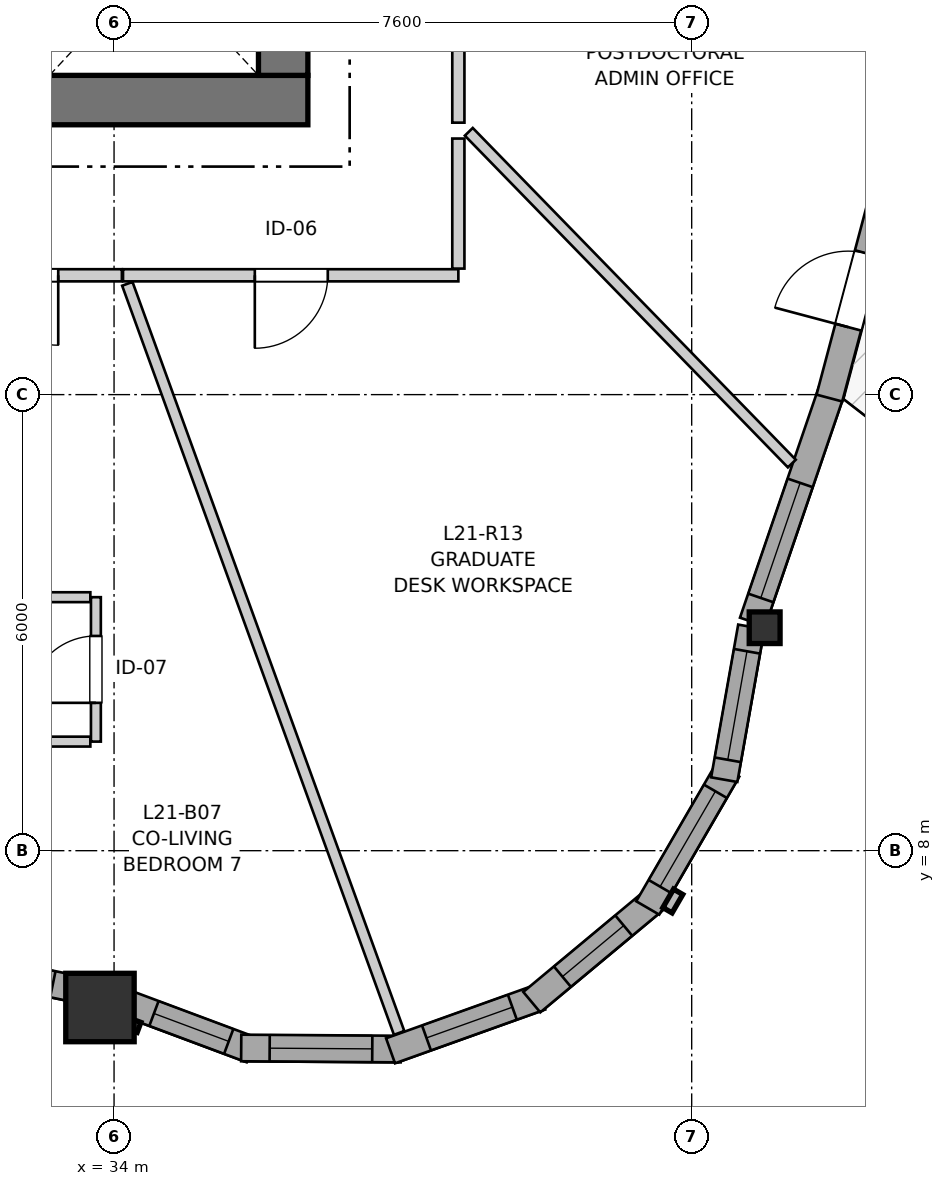
"""IFC4 building model, lengths in metres.
Left out: names, types, materials, properties, quantities, classifications, styles, units other than length and angle.
Written with IfcOpenShell. Run it as: python <this file> out.ifc"""

import sys

from ifc_helpers import new_model, si_unit, direction, frame, frame_2d, origin, origin_2d, place, context, subcontext, project, spatial, rectangle, i_section, extrude, source, transform, mapped, element, fill, save


model = new_model("IFC4")
c1 = context("Model", 3, precision=1e-05, world=origin(), true_north=direction((0.0, 1.0)))
c2 = subcontext(c1, "Body", "Model", "MODEL_VIEW")
j1 = project(units=[si_unit("LENGTHUNIT", "METRE"), si_unit("PLANEANGLEUNIT", "RADIAN")], contexts=[c1])
p1 = place(None, origin())
s1 = spatial("IfcSite", under=j1, at=p1, CompositionType="ELEMENT")
p2 = place(p1, origin())
s2 = spatial("IfcBuilding", under=s1, at=p2, CompositionType="ELEMENT")
p3 = place(p2, frame((0.0, 0.0, 73.6)))
s3 = spatial("IfcBuildingStorey", under=s2, at=p3, CompositionType="ELEMENT", Elevation=73.6)
p4 = place(p3, frame((24.15, 17.875, 0.0), z_axis=(0.0, 0.0, 1.0), x_axis=(1.0, 0.0, 0.0)))
e1 = element("IfcWall", 1, at=p4, inside=s3, PredefinedType="SHEAR", context=c2, shape_type="SweptSolid", body=[
    extrude(rectangle(XDim=12.4, YDim=0.65, at=frame_2d((6.2, 0.0))), origin(), (0.0, 0.0, 1.0), 2.95),
])
p5 = place(p3, frame((36.225, 18.2, 0.0), z_axis=(0.0, 0.0, 1.0), x_axis=(0.0, 1.0, 0.0)))
e2 = element("IfcWall", 2, at=p5, inside=s3, PredefinedType="SHEAR", context=c2, shape_type="SweptSolid", body=[
    extrude(rectangle(XDim=15.6, YDim=0.65, at=frame_2d((7.8, 0.0))), origin(), (0.0, 0.0, 1.0), 2.95),
])
p6 = place(p5, frame((4.25, 0.0, 0.0)))
e3 = element("IfcOpeningElement", 3, at=p6, cuts=e2, PredefinedType="OPENING", context=c2, shape_type="SweptSolid", body=[
    extrude(rectangle(XDim=1.1, YDim=2.15, at=frame_2d((0.55, 1.075))), frame((0.0, 0.335, 0.0), z_axis=(0.0, -1.0, 0.0), x_axis=(1.0, 0.0, 0.0)), (0.0, 0.0, 1.0), 0.67),
])
p7 = place(p5, frame((10.25, 0.0, 0.0)))
e4 = element("IfcOpeningElement", 4, at=p7, cuts=e2, PredefinedType="OPENING", context=c2, shape_type="SweptSolid", body=[
    extrude(rectangle(XDim=1.1, YDim=2.15, at=frame_2d((0.55, 1.075))), frame((0.0, 0.335, 0.0), z_axis=(0.0, -1.0, 0.0), x_axis=(1.0, 0.0, 0.0)), (0.0, 0.0, 1.0), 0.67),
])
m1 = source(origin(), c2, "Body", "SweptSolid", [
    extrude(rectangle(XDim=0.9, YDim=0.9, at=origin_2d()), origin(), (0.0, 0.0, 1.0), 2.95),
])
p8 = place(p3, frame((33.815, 5.937, 0.0), z_axis=(0.0, 0.0, 1.0), x_axis=(1.0, 0.0, 0.0)))
e5 = element("IfcColumn", 5, at=p8, inside=s3, PredefinedType="COLUMN", context=c2, shape_type="MappedRepresentation", body=[
    mapped(m1, transform((0.0, 0.0, 0.0), x_axis=(1.0, 0.0, 0.0), y_axis=(0.0, 1.0, 0.0), z_axis=(0.0, 0.0, 1.0), scale=1.0)),
])
m2 = source(origin(), c2, "Body", "SweptSolid", [
    extrude(i_section(OverallWidth=0.406, OverallDepth=0.416, WebThickness=0.027, FlangeThickness=0.044, FilletRadius=0.015, at=origin_2d()), origin(), (0.0, 0.0, 1.0), 2.95),
])
p9 = place(p3, frame((42.56, 10.933, 0.0), z_axis=(0.0, 0.0, 1.0), x_axis=(1.0, 0.0, 0.0)))
e6 = element("IfcColumn", 6, at=p9, inside=s3, PredefinedType="PILASTER", context=c2, shape_type="MappedRepresentation", body=[
    mapped(m2, transform((0.0, 0.0, 0.0), x_axis=(1.0, 0.0, 0.0), y_axis=(0.0, 1.0, 0.0), z_axis=(0.0, 0.0, 1.0), scale=1.0)),
])
p10 = place(p3, frame((30.741, 6.748, 0.0), z_axis=(0.0, 0.0, 1.0), x_axis=(0.979446941056, -0.201701982282, 0.0)))
e7 = element("IfcWall", 7, at=p10, inside=s3, PredefinedType="SOLIDWALL", context=c2, shape_type="SweptSolid", body=[
    extrude(rectangle(XDim=2.948, YDim=0.35, at=frame_2d((1.474, 0.0))), origin(), (0.0, 0.0, 1.0), 2.48),
])
p11 = place(p10, frame((0.27, 0.0, 0.82)))
e8 = element("IfcOpeningElement", 8, at=p11, cuts=e7, PredefinedType="OPENING", context=c2, shape_type="SweptSolid", body=[
    extrude(rectangle(XDim=1.25, YDim=1.35, at=frame_2d((0.625, 0.675))), frame((0.0, 0.185, 0.0), z_axis=(0.0, -1.0, 0.0), x_axis=(1.0, 0.0, 0.0)), (0.0, 0.0, 1.0), 0.37),
])
p12 = place(p10, frame((1.925, 0.0, 0.82)))
e9 = element("IfcOpeningElement", 9, at=p12, cuts=e7, PredefinedType="OPENING", context=c2, shape_type="SweptSolid", body=[
    extrude(rectangle(XDim=0.58, YDim=1.35, at=frame_2d((0.29, 0.675))), frame((0.0, 0.185, 0.0), z_axis=(0.0, -1.0, 0.0), x_axis=(1.0, 0.0, 0.0)), (0.0, 0.0, 1.0), 0.37),
])
p13 = place(p3, frame((34.087, 6.022, 0.0), z_axis=(0.0, 0.0, 1.0), x_axis=(0.9368310555, -0.349782180007, 0.0)))
e10 = element("IfcWall", 10, at=p13, inside=s3, PredefinedType="SOLIDWALL", context=c2, shape_type="SweptSolid", body=[
    extrude(rectangle(XDim=1.836, YDim=0.35, at=frame_2d((0.918, 0.0))), origin(), (0.0, 0.0, 1.0), 2.48),
])
p14 = place(p13, frame((0.468, 0.0, 0.82)))
e11 = element("IfcOpeningElement", 11, at=p14, cuts=e10, PredefinedType="OPENING", context=c2, shape_type="SweptSolid", body=[
    extrude(rectangle(XDim=1.05, YDim=1.45, at=frame_2d((0.525, 0.725))), frame((0.0, 0.185, 0.0), z_axis=(0.0, -1.0, 0.0), x_axis=(1.0, 0.0, 0.0)), (0.0, 0.0, 1.0), 0.37),
])
p15 = place(p3, frame((35.673, 5.404, 0.0), z_axis=(0.0, 0.0, 1.0), x_axis=(0.999976451414, -0.006862697526, 0.0)))
e12 = element("IfcWall", 12, at=p15, inside=s3, PredefinedType="SOLIDWALL", context=c2, shape_type="SweptSolid", body=[
    extrude(rectangle(XDim=2.099, YDim=0.35, at=frame_2d((1.049, 0.0))), origin(), (0.0, 0.0, 1.0), 2.48),
])
p16 = place(p15, frame((0.375, 0.0, 0.82)))
e13 = element("IfcOpeningElement", 13, at=p16, cuts=e12, PredefinedType="OPENING", context=c2, shape_type="SweptSolid", body=[
    extrude(rectangle(XDim=1.35, YDim=1.45, at=frame_2d((0.675, 0.725))), frame((0.0, 0.185, 0.0), z_axis=(0.0, -1.0, 0.0), x_axis=(1.0, 0.0, 0.0)), (0.0, 0.0, 1.0), 0.37),
])
p17 = place(p3, frame((37.638, 5.367, 0.0), z_axis=(0.0, 0.0, 1.0), x_axis=(0.941486401639, 0.33705096874, 0.0)))
e14 = element("IfcWall", 14, at=p17, inside=s3, PredefinedType="SOLIDWALL", context=c2, shape_type="SweptSolid", body=[
    extrude(rectangle(XDim=2.099, YDim=0.35, at=frame_2d((1.05, 0.0))), origin(), (0.0, 0.0, 1.0), 2.48),
])
p18 = place(p17, frame((0.502, 0.0, 0.82)))
e15 = element("IfcOpeningElement", 15, at=p18, cuts=e14, PredefinedType="OPENING", context=c2, shape_type="SweptSolid", body=[
    extrude(rectangle(XDim=1.2, YDim=1.45, at=frame_2d((0.6, 0.725))), frame((0.0, 0.185, 0.0), z_axis=(0.0, -1.0, 0.0), x_axis=(1.0, 0.0, 0.0)), (0.0, 0.0, 1.0), 0.37),
])
p19 = place(p3, frame((39.496, 6.007, 0.0), z_axis=(0.0, 0.0, 1.0), x_axis=(0.768450068703, 0.639909752942, 0.0)))
e16 = element("IfcWall", 16, at=p19, inside=s3, PredefinedType="SOLIDWALL", context=c2, shape_type="SweptSolid", body=[
    extrude(rectangle(XDim=2.099, YDim=0.35, at=frame_2d((1.049, 0.0))), origin(), (0.0, 0.0, 1.0), 2.48),
])
p20 = place(p19, frame((0.524, 0.0, 0.82)))
e17 = element("IfcOpeningElement", 17, at=p20, cuts=e16, PredefinedType="OPENING", context=c2, shape_type="SweptSolid", body=[
    extrude(rectangle(XDim=1.05, YDim=1.45, at=frame_2d((0.525, 0.725))), frame((0.0, 0.185, 0.0), z_axis=(0.0, -1.0, 0.0), x_axis=(1.0, 0.0, 0.0)), (0.0, 0.0, 1.0), 0.37),
])
p21 = place(p3, frame((41.021, 7.247, 0.0), z_axis=(0.0, 0.0, 1.0), x_axis=(0.501902596059, 0.864924149315, 0.0)))
e18 = element("IfcWall", 18, at=p21, inside=s3, PredefinedType="SOLIDWALL", context=c2, shape_type="SweptSolid", body=[
    extrude(rectangle(XDim=2.099, YDim=0.35, at=frame_2d((1.049, 0.0))), origin(), (0.0, 0.0, 1.0), 2.48),
])
p22 = place(p21, frame((0.324, 0.0, 0.82)))
e19 = element("IfcOpeningElement", 19, at=p22, cuts=e18, PredefinedType="OPENING", context=c2, shape_type="SweptSolid", body=[
    extrude(rectangle(XDim=1.45, YDim=1.25, at=frame_2d((0.725, 0.625))), frame((0.0, 0.185, 0.0), z_axis=(0.0, -1.0, 0.0), x_axis=(1.0, 0.0, 0.0)), (0.0, 0.0, 1.0), 0.37),
])
p23 = place(p3, frame((42.028, 8.934, 0.0), z_axis=(0.0, 0.0, 1.0), x_axis=(0.174399433509, 0.984674990843, 0.0)))
e20 = element("IfcWall", 20, at=p23, inside=s3, PredefinedType="SOLIDWALL", context=c2, shape_type="SweptSolid", body=[
    extrude(rectangle(XDim=2.041, YDim=0.35, at=frame_2d((1.021, 0.0))), origin(), (0.0, 0.0, 1.0), 2.48),
])
p24 = place(p23, frame((0.265, 0.0, 0.82)))
e21 = element("IfcOpeningElement", 21, at=p24, cuts=e20, PredefinedType="OPENING", context=c2, shape_type="SweptSolid", body=[
    extrude(rectangle(XDim=1.45, YDim=1.25, at=frame_2d((0.725, 0.625))), frame((0.0, 0.185, 0.0), z_axis=(0.0, -1.0, 0.0), x_axis=(1.0, 0.0, 0.0)), (0.0, 0.0, 1.0), 0.37),
])
p25 = place(p3, frame((42.401, 11.009, 0.0), z_axis=(0.0, 0.0, 1.0), x_axis=(0.323605065536, 0.946192243447, 0.0)))
e22 = element("IfcWall", 22, at=p25, inside=s3, PredefinedType="SOLIDWALL", context=c2, shape_type="SweptSolid", body=[
    extrude(rectangle(XDim=3.203, YDim=0.35, at=frame_2d((1.601, 0.0))), origin(), (0.0, 0.0, 1.0), 2.48),
])
p26 = place(p25, frame((0.334, 0.0, 0.82)))
e23 = element("IfcOpeningElement", 23, at=p26, cuts=e22, PredefinedType="OPENING", context=c2, shape_type="SweptSolid", body=[
    extrude(rectangle(XDim=1.6, YDim=1.35, at=frame_2d((0.8, 0.675))), frame((0.0, 0.185, 0.0), z_axis=(0.0, -1.0, 0.0), x_axis=(1.0, 0.0, 0.0)), (0.0, 0.0, 1.0), 0.37),
])
p27 = place(p3, frame((43.412, 13.955, 0.0), z_axis=(0.0, 0.0, 1.0), x_axis=(0.257050841376, 0.966397881283, 0.0)))
e24 = element("IfcWall", 24, at=p27, inside=s3, PredefinedType="SOLIDWALL", context=c2, shape_type="SweptSolid", body=[
    extrude(rectangle(XDim=2.931, YDim=0.35, at=frame_2d((1.465, 0.0))), origin(), (0.0, 0.0, 1.0), 2.48),
])
p28 = place(p27, frame((0.966, 0.0, 0.0)))
e25 = element("IfcOpeningElement", 25, at=p28, cuts=e24, PredefinedType="OPENING", context=c2, shape_type="SweptSolid", body=[
    extrude(rectangle(XDim=1.0, YDim=2.1, at=frame_2d((0.5, 1.05))), frame((0.0, 0.185, 0.0), z_axis=(0.0, -1.0, 0.0), x_axis=(1.0, 0.0, 0.0)), (0.0, 0.0, 1.0), 0.37),
])
p29 = place(p3, frame((38.53, 24.781, 0.0), z_axis=(0.0, 0.0, 1.0), x_axis=(0.0, -1.0, 0.0)))
e26 = element("IfcWall", 26, at=p29, inside=s3, PredefinedType="PARTITIONING", context=c2, shape_type="SweptSolid", body=[
    extrude(rectangle(XDim=7.203, YDim=0.16, at=frame_2d((3.602, 0.0))), origin(), (0.0, 0.0, 1.0), 2.95),
])
p30 = place(p29, frame((3.119, 0.0, 0.0)))
e27 = element("IfcOpeningElement", 27, at=p30, cuts=e26, PredefinedType="OPENING", context=c2, shape_type="SweptSolid", body=[
    extrude(rectangle(XDim=0.96, YDim=2.1, at=frame_2d((0.48, 1.05))), frame((0.0, 0.09, 0.0), z_axis=(0.0, -1.0, 0.0), x_axis=(1.0, 0.0, 0.0)), (0.0, 0.0, 1.0), 0.18),
])
p31 = place(p3, frame((38.53, 15.57, 0.0), z_axis=(0.0, 0.0, 1.0), x_axis=(-1.0, 0.0, 0.0)))
e28 = element("IfcWall", 28, at=p31, inside=s3, PredefinedType="PARTITIONING", context=c2, shape_type="SweptSolid", body=[
    extrude(rectangle(XDim=4.412, YDim=0.16, at=frame_2d((2.206, 0.0))), origin(), (0.0, 0.0, 1.0), 2.95),
])
p32 = place(p31, frame((1.718, 0.0, 0.0)))
e29 = element("IfcOpeningElement", 29, at=p32, cuts=e28, PredefinedType="OPENING", context=c2, shape_type="SweptSolid", body=[
    extrude(rectangle(XDim=0.96, YDim=2.1, at=frame_2d((0.48, 1.05))), frame((0.0, 0.09, 0.0), z_axis=(0.0, -1.0, 0.0), x_axis=(1.0, 0.0, 0.0)), (0.0, 0.0, 1.0), 0.18),
])
p33 = place(p3, frame((34.103, 15.57, 0.0), z_axis=(0.0, 0.0, 1.0), x_axis=(-1.0, 0.0, 0.0)))
e30 = element("IfcWall", 30, at=p33, inside=s3, PredefinedType="PARTITIONING", context=c2, shape_type="SweptSolid", body=[
    extrude(rectangle(XDim=2.596, YDim=0.16, at=frame_2d((1.298, 0.0))), origin(), (0.0, 0.0, 1.0), 2.95),
])
p34 = place(p33, frame((0.837, 0.0, 0.0)))
e31 = element("IfcOpeningElement", 31, at=p34, cuts=e30, PredefinedType="OPENING", context=c2, shape_type="SweptSolid", body=[
    extrude(rectangle(XDim=0.92, YDim=2.1, at=frame_2d((0.46, 1.05))), frame((0.0, 0.09, 0.0), z_axis=(0.0, -1.0, 0.0), x_axis=(1.0, 0.0, 0.0)), (0.0, 0.0, 1.0), 0.18),
])
p35 = place(p3, frame((33.761, 9.435, 0.0), z_axis=(0.0, 0.0, 1.0), x_axis=(0.0, 1.0, 0.0)))
e32 = element("IfcWall", 32, at=p35, inside=s3, PredefinedType="PARTITIONING", context=c2, shape_type="SweptSolid", body=[
    extrude(rectangle(XDim=1.9, YDim=0.13, at=frame_2d((0.95, 0.0))), origin(), (0.0, 0.0, 1.0), 2.95),
])
p36 = place(p35, frame((0.51, 0.0, 0.0)))
e33 = element("IfcOpeningElement", 33, at=p36, cuts=e32, PredefinedType="OPENING", context=c2, shape_type="SweptSolid", body=[
    extrude(rectangle(XDim=0.88, YDim=2.05, at=frame_2d((0.44, 1.025))), frame((0.0, 0.075, 0.0), z_axis=(0.0, -1.0, 0.0), x_axis=(1.0, 0.0, 0.0)), (0.0, 0.0, 1.0), 0.15),
])
p37 = place(p3, frame((34.175, 15.458, 0.0), z_axis=(0.0, 0.0, 1.0), x_axis=(0.341079223998, -0.940034554129, 0.0)))
e34 = element("IfcWall", 34, at=p37, inside=s3, PredefinedType="PARTITIONING", context=c2, shape_type="SweptSolid", body=[
    extrude(rectangle(XDim=10.484, YDim=0.145, at=frame_2d((5.242, 0.0))), origin(), (0.0, 0.0, 1.0), 2.95),
])
p38 = place(p3, frame((38.667, 17.458, 0.0), z_axis=(0.0, 0.0, 1.0), x_axis=(0.697626427609, -0.716461699954, 0.0)))
e35 = element("IfcWall", 35, at=p38, inside=s3, PredefinedType="PARTITIONING", context=c2, shape_type="SweptSolid", body=[
    extrude(rectangle(XDim=6.092, YDim=0.145, at=frame_2d((3.046, 0.0))), origin(), (0.0, 0.0, 1.0), 2.95),
])
p39 = place(p3, frame((38.53, 15.658, 0.0), z_axis=(0.0, 0.0, 1.0), x_axis=(0.0, 1.0, 0.0)))
e36 = element("IfcWall", 36, at=p39, inside=s3, PredefinedType="PARTITIONING", context=c2, shape_type="SweptSolid", body=[
    extrude(rectangle(XDim=1.711, YDim=0.16, at=frame_2d((0.855, 0.0))), origin(), (0.0, 0.0, 1.0), 2.95),
])
p40 = place(p3, frame((32.049, 11.335, 0.0), z_axis=(0.0, 0.0, 1.0), x_axis=(1.0, 0.0, 0.0)))
e37 = element("IfcWall", 37, at=p40, inside=s3, PredefinedType="PARTITIONING", context=c2, shape_type="SweptSolid", body=[
    extrude(rectangle(XDim=1.639, YDim=0.13, at=frame_2d((0.82, 0.0))), origin(), (0.0, 0.0, 1.0), 2.95),
])
p41 = place(p3, frame((32.228, 9.435, 0.0), z_axis=(0.0, 0.0, 1.0), x_axis=(1.0, 0.0, 0.0)))
e38 = element("IfcWall", 38, at=p41, inside=s3, PredefinedType="PARTITIONING", context=c2, shape_type="SweptSolid", body=[
    extrude(rectangle(XDim=1.46, YDim=0.13, at=frame_2d((0.73, 0.0))), origin(), (0.0, 0.0, 1.0), 2.95),
])
m3 = source(origin(), c2, "Body", "SweptSolid", [
    extrude(rectangle(XDim=0.58, YDim=1.35, at=frame_2d((0.29, 0.675))), frame((0.0, 0.03, 0.0), z_axis=(0.0, -1.0, 0.0), x_axis=(1.0, 0.0, 0.0)), (0.0, 0.0, 1.0), 0.06),
])
p42 = place(p12, origin())
e39 = element("IfcWindow", 39, at=p42, inside=s3, PartitioningType="SINGLE_PANEL", PredefinedType="WINDOW", context=c2, shape_type="MappedRepresentation", body=[
    mapped(m3, transform((0.0, 0.0, 0.0), x_axis=(1.0, 0.0, 0.0), y_axis=(0.0, 1.0, 0.0), z_axis=(0.0, 0.0, 1.0), scale=1.0)),
])
fill(e9, e39)
m4 = source(origin(), c2, "Body", "SweptSolid", [
    extrude(rectangle(XDim=1.05, YDim=1.45, at=frame_2d((0.525, 0.725))), frame((0.0, 0.03, 0.0), z_axis=(0.0, -1.0, 0.0), x_axis=(1.0, 0.0, 0.0)), (0.0, 0.0, 1.0), 0.06),
])
p43 = place(p14, origin())
e40 = element("IfcWindow", 40, at=p43, inside=s3, PartitioningType="SINGLE_PANEL", PredefinedType="WINDOW", context=c2, shape_type="MappedRepresentation", body=[
    mapped(m4, transform((0.0, 0.0, 0.0), x_axis=(1.0, 0.0, 0.0), y_axis=(0.0, 1.0, 0.0), z_axis=(0.0, 0.0, 1.0), scale=1.0)),
])
fill(e11, e40)
m5 = source(origin(), c2, "Body", "SweptSolid", [
    extrude(rectangle(XDim=1.35, YDim=1.45, at=frame_2d((0.675, 0.725))), frame((0.0, 0.03, 0.0), z_axis=(0.0, -1.0, 0.0), x_axis=(1.0, 0.0, 0.0)), (0.0, 0.0, 1.0), 0.06),
])
p44 = place(p16, origin())
e41 = element("IfcWindow", 41, at=p44, inside=s3, PartitioningType="SINGLE_PANEL", PredefinedType="WINDOW", context=c2, shape_type="MappedRepresentation", body=[
    mapped(m5, transform((0.0, 0.0, 0.0), x_axis=(1.0, 0.0, 0.0), y_axis=(0.0, 1.0, 0.0), z_axis=(0.0, 0.0, 1.0), scale=1.0)),
])
fill(e13, e41)
m6 = source(origin(), c2, "Body", "SweptSolid", [
    extrude(rectangle(XDim=1.2, YDim=1.45, at=frame_2d((0.6, 0.725))), frame((0.0, 0.03, 0.0), z_axis=(0.0, -1.0, 0.0), x_axis=(1.0, 0.0, 0.0)), (0.0, 0.0, 1.0), 0.06),
])
p45 = place(p18, origin())
e42 = element("IfcWindow", 42, at=p45, inside=s3, PartitioningType="SINGLE_PANEL", PredefinedType="WINDOW", context=c2, shape_type="MappedRepresentation", body=[
    mapped(m6, transform((0.0, 0.0, 0.0), x_axis=(1.0, 0.0, 0.0), y_axis=(0.0, 1.0, 0.0), z_axis=(0.0, 0.0, 1.0), scale=1.0)),
])
fill(e15, e42)
p46 = place(p20, origin())
e43 = element("IfcWindow", 43, at=p46, inside=s3, PartitioningType="SINGLE_PANEL", PredefinedType="WINDOW", context=c2, shape_type="MappedRepresentation", body=[
    mapped(m4, transform((0.0, 0.0, 0.0), x_axis=(1.0, 0.0, 0.0), y_axis=(0.0, 1.0, 0.0), z_axis=(0.0, 0.0, 1.0), scale=1.0)),
])
fill(e17, e43)
m7 = source(origin(), c2, "Body", "SweptSolid", [
    extrude(rectangle(XDim=1.45, YDim=1.25, at=frame_2d((0.725, 0.625))), frame((0.0, 0.03, 0.0), z_axis=(0.0, -1.0, 0.0), x_axis=(1.0, 0.0, 0.0)), (0.0, 0.0, 1.0), 0.06),
])
p47 = place(p22, origin())
e44 = element("IfcWindow", 44, at=p47, inside=s3, PartitioningType="SINGLE_PANEL", PredefinedType="WINDOW", context=c2, shape_type="MappedRepresentation", body=[
    mapped(m7, transform((0.0, 0.0, 0.0), x_axis=(1.0, 0.0, 0.0), y_axis=(0.0, 1.0, 0.0), z_axis=(0.0, 0.0, 1.0), scale=1.0)),
])
fill(e19, e44)
p48 = place(p24, origin())
e45 = element("IfcWindow", 45, at=p48, inside=s3, PartitioningType="SINGLE_PANEL", PredefinedType="WINDOW", context=c2, shape_type="MappedRepresentation", body=[
    mapped(m7, transform((0.0, 0.0, 0.0), x_axis=(1.0, 0.0, 0.0), y_axis=(0.0, 1.0, 0.0), z_axis=(0.0, 0.0, 1.0), scale=1.0)),
])
fill(e21, e45)
m8 = source(origin(), c2, "Body", "SweptSolid", [
    extrude(rectangle(XDim=1.6, YDim=1.35, at=frame_2d((0.8, 0.675))), frame((0.0, 0.03, 0.0), z_axis=(0.0, -1.0, 0.0), x_axis=(1.0, 0.0, 0.0)), (0.0, 0.0, 1.0), 0.06),
])
p49 = place(p26, origin())
e46 = element("IfcWindow", 46, at=p49, inside=s3, PartitioningType="SINGLE_PANEL", PredefinedType="WINDOW", context=c2, shape_type="MappedRepresentation", body=[
    mapped(m8, transform((0.0, 0.0, 0.0), x_axis=(1.0, 0.0, 0.0), y_axis=(0.0, 1.0, 0.0), z_axis=(0.0, 0.0, 1.0), scale=1.0)),
])
fill(e23, e46)
m9 = source(origin(), c2, "Body", "SweptSolid", [
    extrude(rectangle(XDim=1.0, YDim=2.1, at=frame_2d((0.5, 1.05))), frame((0.0, 0.025, 0.0), z_axis=(0.0, -1.0, 0.0), x_axis=(1.0, 0.0, 0.0)), (0.0, 0.0, 1.0), 0.05),
])
p50 = place(p28, origin())
e47 = element("IfcDoor", 47, at=p50, inside=s3, OperationType="SINGLE_SWING_LEFT", PredefinedType="DOOR", context=c2, shape_type="MappedRepresentation", body=[
    mapped(m9, transform((0.0, 0.0, 0.0), x_axis=(1.0, 0.0, 0.0), y_axis=(0.0, 1.0, 0.0), z_axis=(0.0, 0.0, 1.0), scale=1.0)),
])
fill(e25, e47)
m10 = source(origin(), c2, "Body", "SweptSolid", [
    extrude(rectangle(XDim=0.96, YDim=2.1, at=frame_2d((0.48, 1.05))), frame((0.0, 0.025, 0.0), z_axis=(0.0, -1.0, 0.0), x_axis=(1.0, 0.0, 0.0)), (0.0, 0.0, 1.0), 0.05),
])
p51 = place(p32, origin())
e48 = element("IfcDoor", 48, at=p51, inside=s3, OperationType="SINGLE_SWING_RIGHT", PredefinedType="DOOR", context=c2, shape_type="MappedRepresentation", body=[
    mapped(m10, transform((0.0, 0.0, 0.0), x_axis=(1.0, 0.0, 0.0), y_axis=(0.0, 1.0, 0.0), z_axis=(0.0, 0.0, 1.0), scale=1.0)),
])
fill(e29, e48)
m11 = source(origin(), c2, "Body", "SweptSolid", [
    extrude(rectangle(XDim=0.92, YDim=2.1, at=frame_2d((0.46, 1.05))), frame((0.0, 0.025, 0.0), z_axis=(0.0, -1.0, 0.0), x_axis=(1.0, 0.0, 0.0)), (0.0, 0.0, 1.0), 0.05),
])
p52 = place(p34, origin())
e49 = element("IfcDoor", 49, at=p52, inside=s3, OperationType="SINGLE_SWING_LEFT", PredefinedType="DOOR", context=c2, shape_type="MappedRepresentation", body=[
    mapped(m11, transform((0.0, 0.0, 0.0), x_axis=(1.0, 0.0, 0.0), y_axis=(0.0, 1.0, 0.0), z_axis=(0.0, 0.0, 1.0), scale=1.0)),
])
fill(e31, e49)
m12 = source(origin(), c2, "Body", "SweptSolid", [
    extrude(rectangle(XDim=0.88, YDim=2.05, at=frame_2d((0.44, 1.025))), frame((0.0, 0.025, 0.0), z_axis=(0.0, -1.0, 0.0), x_axis=(1.0, 0.0, 0.0)), (0.0, 0.0, 1.0), 0.05),
])
p53 = place(p36, origin())
e50 = element("IfcDoor", 50, at=p53, inside=s3, OperationType="SINGLE_SWING_LEFT", PredefinedType="DOOR", context=c2, shape_type="MappedRepresentation", body=[
    mapped(m12, transform((0.0, 0.0, 0.0), x_axis=(1.0, 0.0, 0.0), y_axis=(0.0, 1.0, 0.0), z_axis=(0.0, 0.0, 1.0), scale=1.0)),
])
fill(e33, e50)
save(model, sys.argv[1])
